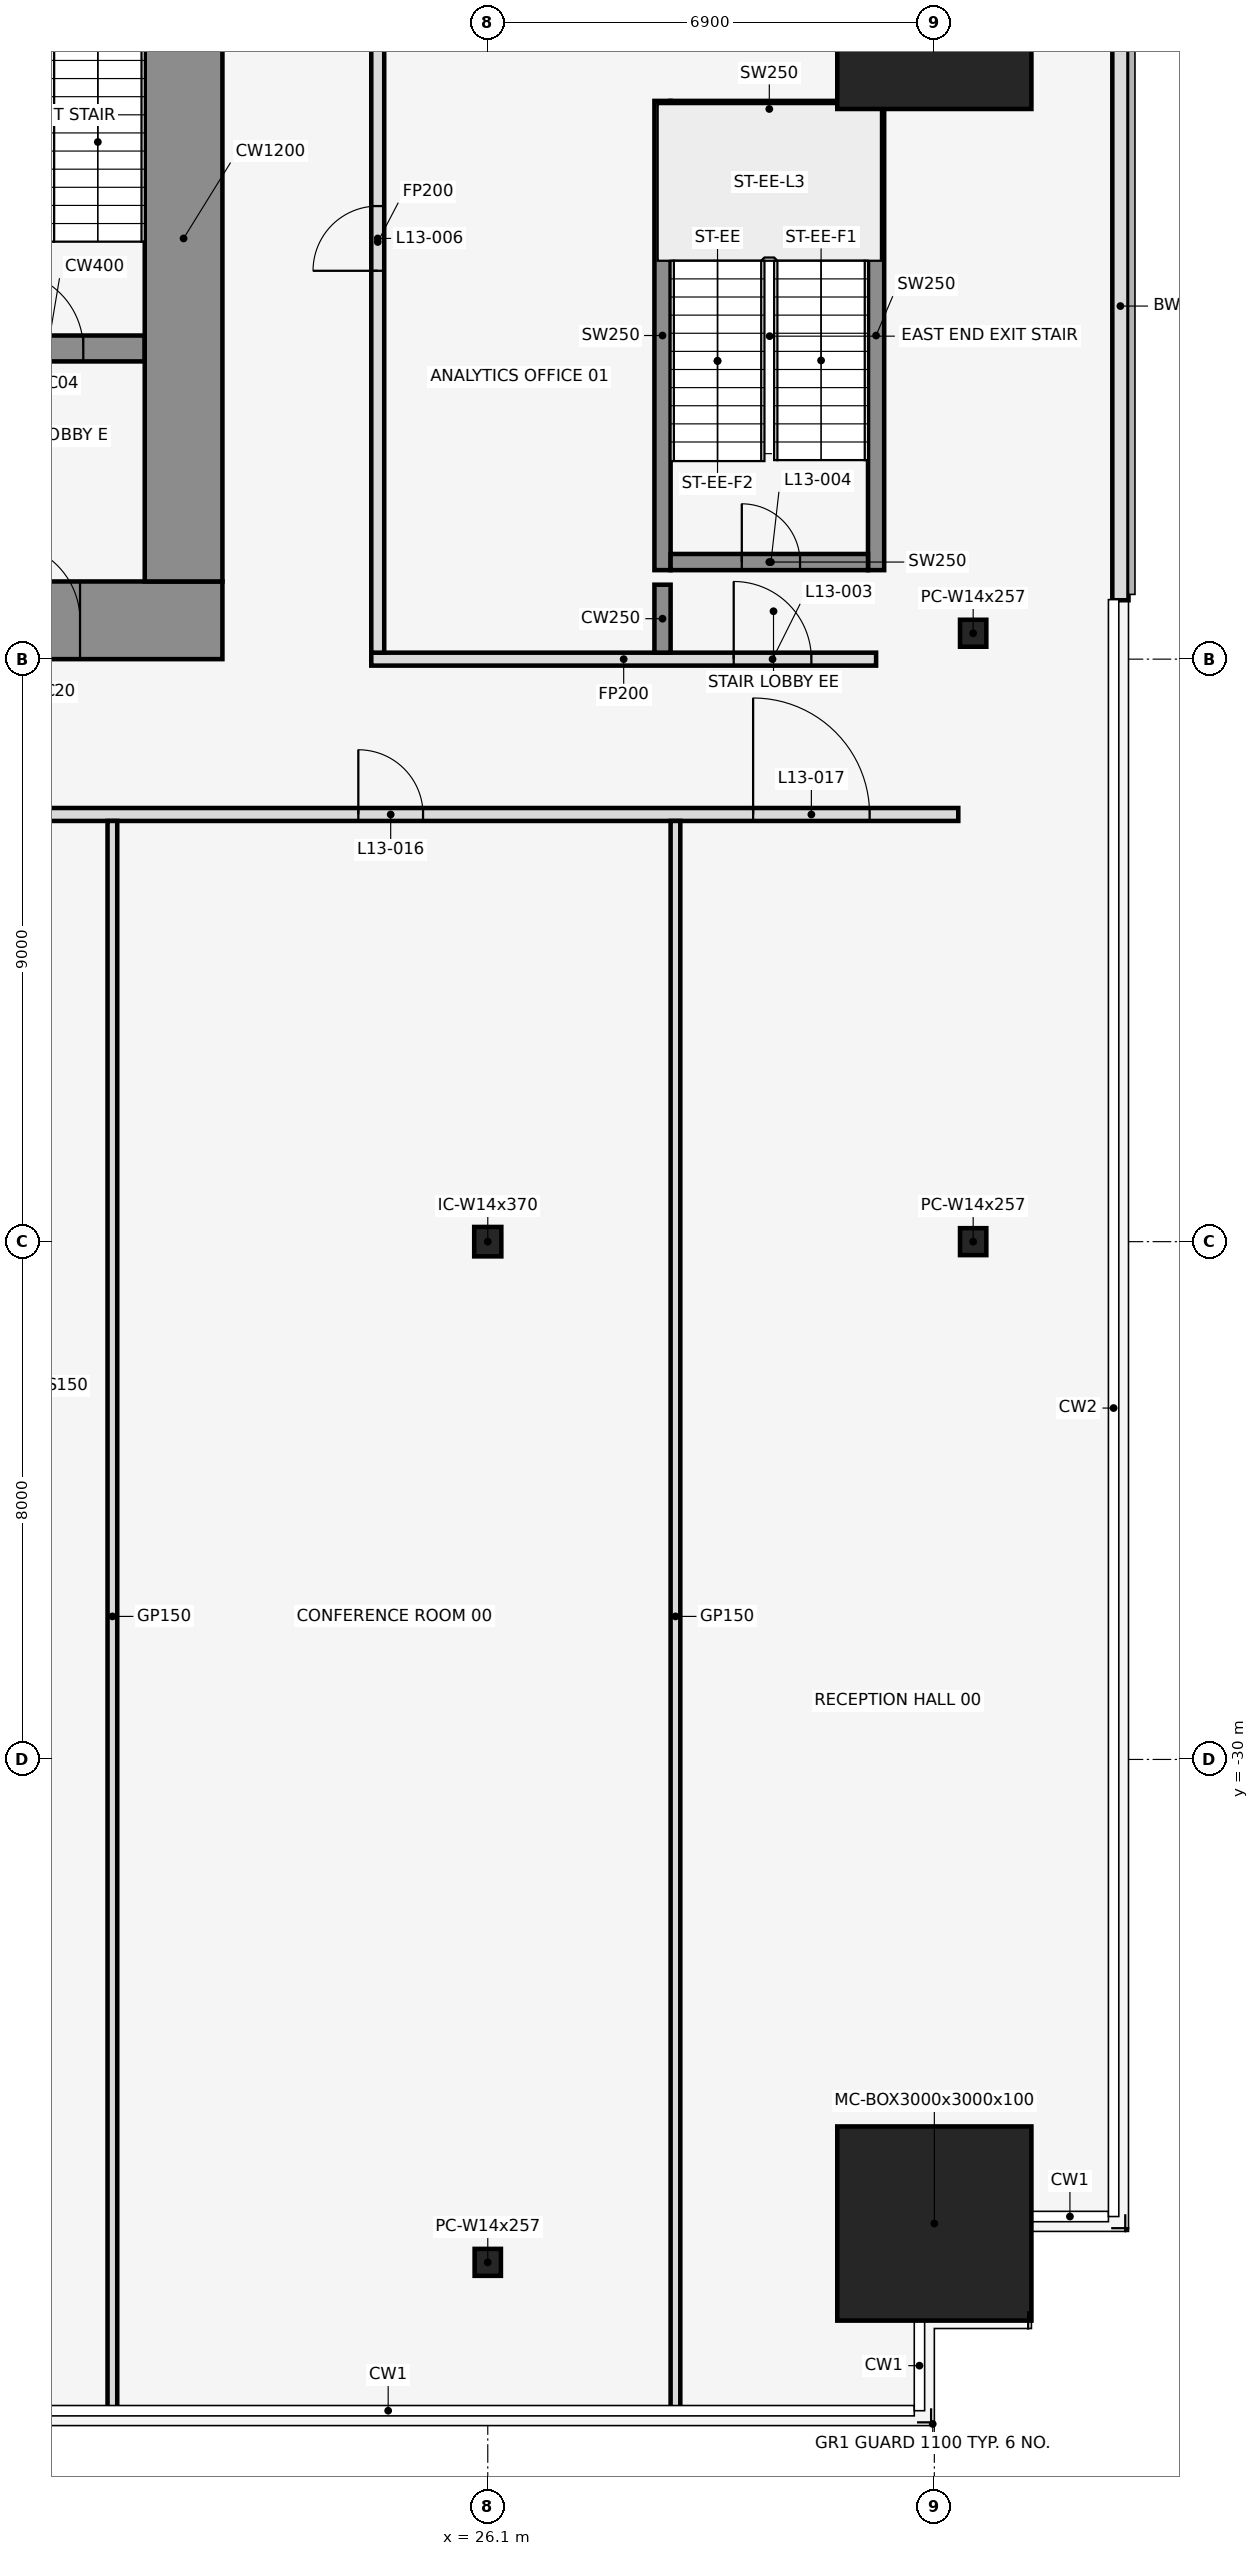
"""IFC4 building model, lengths in metres.
Left out: names, types, materials, properties, quantities, classifications, styles, units other than length and angle.
Written with IfcOpenShell. Run it as: python <this file> out.ifc"""

import sys

from ifc_helpers import new_model, si_unit, direction, frame, frame_2d, origin, origin_2d, place, context, subcontext, project, spatial, rectangle, hollow_rectangle, i_section, extrude, element, fill, save


model = new_model("IFC4")
c1 = context("Model", 3, precision=1e-05, world=origin(), true_north=direction((0.0, 1.0)))
c2 = subcontext(c1, "Body", "Model", "MODEL_VIEW")
j1 = project(units=[si_unit("LENGTHUNIT", "METRE"), si_unit("PLANEANGLEUNIT", "RADIAN")], contexts=[c1])
p1 = place(None, origin())
s1 = spatial("IfcSite", under=j1, at=p1, CompositionType="ELEMENT")
p2 = place(p1, origin())
s2 = spatial("IfcBuilding", under=s1, at=p2, CompositionType="ELEMENT")
p3 = place(p2, frame((0.0, 0.0, 66.5)))
s3 = spatial("IfcBuildingStorey", under=s2, at=p3, CompositionType="ELEMENT", Elevation=66.5)
p4 = place(p3, frame((26.1, -37.77, 0.0), z_axis=(0.0, 0.0, 1.0), x_axis=(1.0, 0.0, 0.0)))
e1 = element("IfcColumn", 1, at=p4, inside=s3, PredefinedType="COLUMN", context=c2, shape_type="SweptSolid", body=[
    extrude(i_section(OverallWidth=0.406, OverallDepth=0.417, WebThickness=0.03, FlangeThickness=0.048, at=origin_2d()), origin(), (0.0, 0.0, 1.0), 4.5),
])
for number, where, z_axis, x_axis in (
    (2, (33.0, -37.17, 0.0), (0.0, 0.0, 1.0), (1.0, 0.0, 0.0)),
    (3, (33.0, -3.0, 0.0), (0.0, 0.0, 1.0), (1.0, 0.0, 0.0)),
):
    element("IfcColumn", number, at=place(p3, frame(where, z_axis=z_axis, x_axis=x_axis)), inside=s3, PredefinedType="COLUMN", context=c2, shape_type="SweptSolid", body=[
        extrude(hollow_rectangle(XDim=3.0, YDim=3.0, WallThickness=0.1, at=origin_2d()), origin(), (0.0, 0.0, 1.0), 4.5),
    ])
for number, where, z_axis, x_axis in (
    (4, (33.6, -12.6, 0.0), (0.0, 0.0, 1.0), (1.0, 0.0, 0.0)),
    (5, (33.6, -22.0, 0.0), (0.0, 0.0, 1.0), (1.0, 0.0, 0.0)),
):
    element("IfcColumn", number, at=place(p3, frame(where, z_axis=z_axis, x_axis=x_axis)), inside=s3, PredefinedType="COLUMN", context=c2, shape_type="SweptSolid", body=[
        extrude(i_section(OverallWidth=0.406, OverallDepth=0.417, WebThickness=0.03, FlangeThickness=0.048, at=origin_2d()), origin(), (0.0, 0.0, 1.0), 4.5),
    ])
p5 = place(p3, frame((26.1, -22.0, 0.0), z_axis=(0.0, 0.0, 1.0), x_axis=(1.0, 0.0, 0.0)))
e6 = element("IfcColumn", 6, at=p5, inside=s3, PredefinedType="COLUMN", context=c2, shape_type="SweptSolid", body=[
    extrude(i_section(OverallWidth=0.419, OverallDepth=0.455, WebThickness=0.042, FlangeThickness=0.068, at=origin_2d()), origin(), (0.0, 0.0, 1.0), 4.5),
])
p6 = place(p3, frame((35.875, -12.09, 0.0), z_axis=(0.0, 0.0, 1.0), x_axis=(0.0, 1.0, 0.0)))
e7 = element("IfcWall", 7, at=p6, inside=s3, PredefinedType="STANDARD", context=c2, shape_type="SweptSolid", body=[
    extrude(rectangle(XDim=9.09, YDim=0.25, at=frame_2d((4.545, 0.0))), origin(), (0.0, 0.0, 1.0), 4.35),
])
for number, where, z_axis, x_axis in (
    (8, (28.8, -11.625, 0.0), (0.0, 0.0, 1.0), (0.0, 1.0, 0.0)),
    (9, (32.1, -11.625, 0.0), (0.0, 0.0, 1.0), (0.0, 1.0, 0.0)),
):
    element("IfcWall", number, at=place(p3, frame(where, z_axis=z_axis, x_axis=x_axis)), inside=s3, PredefinedType="SHEAR", context=c2, shape_type="SweptSolid", body=[
        extrude(rectangle(XDim=7.25, YDim=0.25, at=frame_2d((3.625, 0.0))), origin(), (0.0, 0.0, 1.0), 4.5),
    ])
p7 = place(p3, frame((28.925, -11.5, 0.0), z_axis=(0.0, 0.0, 1.0), x_axis=(1.0, 0.0, 0.0)))
e10 = element("IfcWall", 10, at=p7, inside=s3, PredefinedType="SHEAR", context=c2, shape_type="SweptSolid", body=[
    extrude(rectangle(XDim=3.05, YDim=0.25, at=frame_2d((1.525, 0.0))), origin(), (0.0, 0.0, 1.0), 4.5),
])
p8 = place(p7, frame((1.1, 0.0, 0.0)))
e11 = element("IfcOpeningElement", 11, at=p8, cuts=e10, PredefinedType="OPENING", context=c2, shape_type="SweptSolid", body=[
    extrude(rectangle(XDim=0.9, YDim=2.1, at=frame_2d((0.45, 1.05))), frame((0.0, 0.137, 0.0), z_axis=(0.0, -1.0, 0.0), x_axis=(1.0, 0.0, 0.0)), (0.0, 0.0, 1.0), 0.274),
])
p9 = place(p3, frame((28.925, -4.5, 0.0), z_axis=(0.0, 0.0, 1.0), x_axis=(1.0, 0.0, 0.0)))
e12 = element("IfcWall", 12, at=p9, inside=s3, PredefinedType="SHEAR", context=c2, shape_type="SweptSolid", body=[
    extrude(rectangle(XDim=3.05, YDim=0.25, at=frame_2d((1.525, 0.0))), origin(), (0.0, 0.0, 1.0), 4.5),
])
p10 = place(p3, frame((-33.37, -15.4, 0.0), z_axis=(0.0, 0.0, 1.0), x_axis=(1.0, 0.0, 0.0)))
e13 = element("IfcWall", 13, at=p10, inside=s3, PredefinedType="PARTITIONING", context=c2, shape_type="SweptSolid", body=[
    extrude(rectangle(XDim=66.74, YDim=0.2, at=frame_2d((33.37, 0.0))), origin(), (0.0, 0.0, 1.0), 3.418),
])
p11 = place(p10, frame((2.8, 0.0, 0.0)))
e14 = element("IfcOpeningElement", 14, at=p11, cuts=e13, PredefinedType="OPENING", context=c2, shape_type="SweptSolid", body=[
    extrude(rectangle(XDim=1.8, YDim=2.1, at=frame_2d((0.9, 1.05))), frame((0.0, 0.112, 0.0), z_axis=(0.0, -1.0, 0.0), x_axis=(1.0, 0.0, 0.0)), (0.0, 0.0, 1.0), 0.224),
])
p12 = place(p10, frame((11.17, 0.0, 0.0)))
e15 = element("IfcOpeningElement", 15, at=p12, cuts=e13, PredefinedType="OPENING", context=c2, shape_type="SweptSolid", body=[
    extrude(rectangle(XDim=0.9, YDim=2.1, at=frame_2d((0.45, 1.05))), frame((0.0, 0.112, 0.0), z_axis=(0.0, -1.0, 0.0), x_axis=(1.0, 0.0, 0.0)), (0.0, 0.0, 1.0), 0.224),
])
p13 = place(p10, frame((19.87, 0.0, 0.0)))
e16 = element("IfcOpeningElement", 16, at=p13, cuts=e13, PredefinedType="OPENING", context=c2, shape_type="SweptSolid", body=[
    extrude(rectangle(XDim=1.0, YDim=2.1, at=frame_2d((0.5, 1.05))), frame((0.0, 0.112, 0.0), z_axis=(0.0, -1.0, 0.0), x_axis=(1.0, 0.0, 0.0)), (0.0, 0.0, 1.0), 0.224),
])
p14 = place(p10, frame((26.67, 0.0, 0.0)))
e17 = element("IfcOpeningElement", 17, at=p14, cuts=e13, PredefinedType="OPENING", context=c2, shape_type="SweptSolid", body=[
    extrude(rectangle(XDim=1.8, YDim=2.1, at=frame_2d((0.9, 1.05))), frame((0.0, 0.112, 0.0), z_axis=(0.0, -1.0, 0.0), x_axis=(1.0, 0.0, 0.0)), (0.0, 0.0, 1.0), 0.224),
])
p15 = place(p10, frame((33.87, 0.0, 0.0)))
e18 = element("IfcOpeningElement", 18, at=p15, cuts=e13, PredefinedType="OPENING", context=c2, shape_type="SweptSolid", body=[
    extrude(rectangle(XDim=1.8, YDim=2.1, at=frame_2d((0.9, 1.05))), frame((0.0, 0.112, 0.0), z_axis=(0.0, -1.0, 0.0), x_axis=(1.0, 0.0, 0.0)), (0.0, 0.0, 1.0), 0.224),
])
p16 = place(p10, frame((45.47, 0.0, 0.0)))
e19 = element("IfcOpeningElement", 19, at=p16, cuts=e13, PredefinedType="OPENING", context=c2, shape_type="SweptSolid", body=[
    extrude(rectangle(XDim=1.8, YDim=2.1, at=frame_2d((0.9, 1.05))), frame((0.0, 0.112, 0.0), z_axis=(0.0, -1.0, 0.0), x_axis=(1.0, 0.0, 0.0)), (0.0, 0.0, 1.0), 0.224),
])
p17 = place(p10, frame((57.47, 0.0, 0.0)))
e20 = element("IfcOpeningElement", 20, at=p17, cuts=e13, PredefinedType="OPENING", context=c2, shape_type="SweptSolid", body=[
    extrude(rectangle(XDim=1.0, YDim=2.1, at=frame_2d((0.5, 1.05))), frame((0.0, 0.112, 0.0), z_axis=(0.0, -1.0, 0.0), x_axis=(1.0, 0.0, 0.0)), (0.0, 0.0, 1.0), 0.224),
])
p18 = place(p10, frame((63.57, 0.0, 0.0)))
e21 = element("IfcOpeningElement", 21, at=p18, cuts=e13, PredefinedType="OPENING", context=c2, shape_type="SweptSolid", body=[
    extrude(rectangle(XDim=1.8, YDim=2.1, at=frame_2d((0.9, 1.05))), frame((0.0, 0.112, 0.0), z_axis=(0.0, -1.0, 0.0), x_axis=(1.0, 0.0, 0.0)), (0.0, 0.0, 1.0), 0.224),
])
p19 = place(p3, frame((24.3, -13.0, 0.0), z_axis=(0.0, 0.0, 1.0), x_axis=(1.0, 0.0, 0.0)))
e22 = element("IfcWall", 22, at=p19, inside=s3, PredefinedType="PARTITIONING", context=c2, shape_type="SweptSolid", body=[
    extrude(rectangle(XDim=7.8, YDim=0.2, at=frame_2d((3.9, 0.0))), origin(), (0.0, 0.0, 1.0), 3.418),
])
p20 = place(p19, frame((5.6, 0.0, 0.0)))
e23 = element("IfcOpeningElement", 23, at=p20, cuts=e22, PredefinedType="OPENING", context=c2, shape_type="SweptSolid", body=[
    extrude(rectangle(XDim=1.2, YDim=2.1, at=frame_2d((0.6, 1.05))), frame((0.0, 0.112, 0.0), z_axis=(0.0, -1.0, 0.0), x_axis=(1.0, 0.0, 0.0)), (0.0, 0.0, 1.0), 0.224),
])
p21 = place(p3, frame((20.3, -40.08, 0.0), z_axis=(0.0, 0.0, 1.0), x_axis=(0.0, 1.0, 0.0)))
e24 = element("IfcWall", 24, at=p21, inside=s3, PredefinedType="PARTITIONING", context=c2, shape_type="SweptSolid", body=[
    extrude(rectangle(XDim=24.58, YDim=0.15, at=frame_2d((12.29, 0.0))), origin(), (0.0, 0.0, 1.0), 3.418),
])
p22 = place(p3, frame((24.4, -12.9, 0.0), z_axis=(0.0, 0.0, 1.0), x_axis=(0.0, 1.0, 0.0)))
e25 = element("IfcWall", 25, at=p22, inside=s3, PredefinedType="PARTITIONING", context=c2, shape_type="SweptSolid", body=[
    extrude(rectangle(XDim=12.69, YDim=0.2, at=frame_2d((6.345, 0.0))), origin(), (0.0, 0.0, 1.0), 3.418),
])
p23 = place(p22, frame((5.9, 0.0, 0.0)))
e26 = element("IfcOpeningElement", 26, at=p23, cuts=e25, PredefinedType="OPENING", context=c2, shape_type="SweptSolid", body=[
    extrude(rectangle(XDim=1.0, YDim=2.1, at=frame_2d((0.5, 1.05))), frame((0.0, 0.112, 0.0), z_axis=(0.0, -1.0, 0.0), x_axis=(1.0, 0.0, 0.0)), (0.0, 0.0, 1.0), 0.224),
])
p24 = place(p3, frame((28.8, -12.9, 0.0), z_axis=(0.0, 0.0, 1.0), x_axis=(0.0, 1.0, 0.0)))
e27 = element("IfcWall", 27, at=p24, inside=s3, PredefinedType="SHEAR", context=c2, shape_type="SweptSolid", body=[
    extrude(rectangle(XDim=1.05, YDim=0.25, at=frame_2d((0.525, 0.0))), origin(), (0.0, 0.0, 1.0), 4.5),
])
p25 = place(p3, frame((29.0, -40.08, 0.0), z_axis=(0.0, 0.0, 1.0), x_axis=(0.0, 1.0, 0.0)))
e28 = element("IfcWall", 28, at=p25, inside=s3, PredefinedType="PARTITIONING", context=c2, shape_type="SweptSolid", body=[
    extrude(rectangle(XDim=24.58, YDim=0.15, at=frame_2d((12.29, 0.0))), origin(), (0.0, 0.0, 1.0), 3.418),
])
p26 = place(p3, frame((17.8, -8.2, 0.0), z_axis=(0.0, 0.0, 1.0), x_axis=(1.0, 0.0, 0.0)))
e29 = element("IfcWall", 29, at=p26, inside=s3, PredefinedType="SHEAR", context=c2, shape_type="SweptSolid", body=[
    extrude(rectangle(XDim=3.0, YDim=0.4, at=frame_2d((1.5, 0.0))), origin(), (0.0, 0.0, 1.0), 4.5),
])
p27 = place(p26, frame((0.85, 0.0, 0.0)))
e30 = element("IfcOpeningElement", 30, at=p27, cuts=e29, PredefinedType="OPENING", context=c2, shape_type="SweptSolid", body=[
    extrude(rectangle(XDim=1.2, YDim=2.1, at=frame_2d((0.6, 1.05))), frame((0.0, 0.212, 0.0), z_axis=(0.0, -1.0, 0.0), x_axis=(1.0, 0.0, 0.0)), (0.0, 0.0, 1.0), 0.424),
])
p28 = place(p3, frame((-22.0, -12.4, 0.0), z_axis=(0.0, 0.0, 1.0), x_axis=(1.0, 0.0, 0.0)))
e31 = element("IfcWall", 31, at=p28, inside=s3, PredefinedType="SHEAR", context=c2, shape_type="SweptSolid", body=[
    extrude(rectangle(XDim=44.0, YDim=1.2, at=frame_2d((22.0, 0.0))), origin(), (0.0, 0.0, 1.0), 4.5),
])
p29 = place(p28, frame((2.2, 0.0, 0.0)))
e32 = element("IfcOpeningElement", 32, at=p29, cuts=e31, PredefinedType="OPENING", context=c2, shape_type="SweptSolid", body=[
    extrude(rectangle(XDim=1.2, YDim=2.1, at=frame_2d((0.6, 1.05))), frame((0.0, 0.612, 0.0), z_axis=(0.0, -1.0, 0.0), x_axis=(1.0, 0.0, 0.0)), (0.0, 0.0, 1.0), 1.224),
])
p30 = place(p28, frame((21.4, 0.0, 0.0)))
e33 = element("IfcOpeningElement", 33, at=p30, cuts=e31, PredefinedType="OPENING", context=c2, shape_type="SweptSolid", body=[
    extrude(rectangle(XDim=1.2, YDim=2.1, at=frame_2d((0.6, 1.05))), frame((0.0, 0.612, 0.0), z_axis=(0.0, -1.0, 0.0), x_axis=(1.0, 0.0, 0.0)), (0.0, 0.0, 1.0), 1.224),
])
p31 = place(p28, frame((40.6, 0.0, 0.0)))
e34 = element("IfcOpeningElement", 34, at=p31, cuts=e31, PredefinedType="OPENING", context=c2, shape_type="SweptSolid", body=[
    extrude(rectangle(XDim=1.2, YDim=2.1, at=frame_2d((0.6, 1.05))), frame((0.0, 0.612, 0.0), z_axis=(0.0, -1.0, 0.0), x_axis=(1.0, 0.0, 0.0)), (0.0, 0.0, 1.0), 1.224),
])
p32 = place(p28, frame((16.0, 0.0, 0.0)))
e35 = element("IfcOpeningElement", 35, at=p32, cuts=e31, PredefinedType="OPENING", context=c2, shape_type="SweptSolid", body=[
    extrude(rectangle(XDim=1.8, YDim=2.1, at=frame_2d((0.9, 1.05))), frame((0.0, 0.612, 0.0), z_axis=(0.0, -1.0, 0.0), x_axis=(1.0, 0.0, 0.0)), (0.0, 0.0, 1.0), 1.224),
])
p33 = place(p28, frame((6.3, 0.0, 0.0)))
e36 = element("IfcOpeningElement", 36, at=p33, cuts=e31, PredefinedType="OPENING", context=c2, shape_type="SweptSolid", body=[
    extrude(rectangle(XDim=1.2, YDim=2.1, at=frame_2d((0.6, 1.05))), frame((0.0, 0.612, 0.0), z_axis=(0.0, -1.0, 0.0), x_axis=(1.0, 0.0, 0.0)), (0.0, 0.0, 1.0), 1.224),
])
p34 = place(p28, frame((26.2, 0.0, 0.0)))
e37 = element("IfcOpeningElement", 37, at=p34, cuts=e31, PredefinedType="OPENING", context=c2, shape_type="SweptSolid", body=[
    extrude(rectangle(XDim=1.8, YDim=2.1, at=frame_2d((0.9, 1.05))), frame((0.0, 0.612, 0.0), z_axis=(0.0, -1.0, 0.0), x_axis=(1.0, 0.0, 0.0)), (0.0, 0.0, 1.0), 1.224),
])
p35 = place(p28, frame((36.5, 0.0, 0.0)))
e38 = element("IfcOpeningElement", 38, at=p35, cuts=e31, PredefinedType="OPENING", context=c2, shape_type="SweptSolid", body=[
    extrude(rectangle(XDim=1.2, YDim=2.1, at=frame_2d((0.6, 1.05))), frame((0.0, 0.612, 0.0), z_axis=(0.0, -1.0, 0.0), x_axis=(1.0, 0.0, 0.0)), (0.0, 0.0, 1.0), 1.224),
])
p36 = place(p3, frame((21.4, -11.8, 0.0), z_axis=(0.0, 0.0, 1.0), x_axis=(0.0, 1.0, 0.0)))
e39 = element("IfcWall", 39, at=p36, inside=s3, PredefinedType="SHEAR", context=c2, shape_type="SweptSolid", body=[
    extrude(rectangle(XDim=10.6, YDim=1.2, at=frame_2d((5.3, 0.0))), origin(), (0.0, 0.0, 1.0), 4.5),
])
p37 = place(p20, origin())
e40 = element("IfcDoor", 40, at=p37, inside=s3, OperationType="SINGLE_SWING_RIGHT", PredefinedType="DOOR", context=c2, shape_type="SweptSolid", body=[
    extrude(rectangle(XDim=1.2, YDim=2.1, at=frame_2d((0.6, 1.05))), frame((0.0, 0.025, 0.0), z_axis=(0.0, -1.0, 0.0), x_axis=(1.0, 0.0, 0.0)), (0.0, 0.0, 1.0), 0.05),
])
fill(e23, e40)
p38 = place(p8, origin())
e41 = element("IfcDoor", 41, at=p38, inside=s3, OperationType="SINGLE_SWING_LEFT", PredefinedType="DOOR", context=c2, shape_type="SweptSolid", body=[
    extrude(rectangle(XDim=0.9, YDim=2.1, at=frame_2d((0.45, 1.05))), frame((0.0, 0.025, 0.0), z_axis=(0.0, -1.0, 0.0), x_axis=(1.0, 0.0, 0.0)), (0.0, 0.0, 1.0), 0.05),
])
fill(e11, e41)
p39 = place(p23, frame((1.0, 0.0, 0.0), z_axis=(0.0, 0.0, 1.0), x_axis=(-1.0, 0.0, 0.0)))
e42 = element("IfcDoor", 42, at=p39, inside=s3, OperationType="SINGLE_SWING_RIGHT", PredefinedType="DOOR", context=c2, shape_type="SweptSolid", body=[
    extrude(rectangle(XDim=1.0, YDim=2.1, at=frame_2d((0.5, 1.05))), frame((0.0, 0.025, 0.0), z_axis=(0.0, -1.0, 0.0), x_axis=(1.0, 0.0, 0.0)), (0.0, 0.0, 1.0), 0.05),
])
fill(e26, e42)
p40 = place(p17, frame((1.0, 0.0, 0.0), z_axis=(0.0, 0.0, 1.0), x_axis=(-1.0, 0.0, 0.0)))
e43 = element("IfcDoor", 43, at=p40, inside=s3, OperationType="SINGLE_SWING_LEFT", PredefinedType="DOOR", context=c2, shape_type="SweptSolid", body=[
    extrude(rectangle(XDim=1.0, YDim=2.1, at=frame_2d((0.5, 1.05))), frame((0.0, 0.025, 0.0), z_axis=(0.0, -1.0, 0.0), x_axis=(1.0, 0.0, 0.0)), (0.0, 0.0, 1.0), 0.05),
])
fill(e20, e43)
p41 = place(p18, origin())
e44 = element("IfcDoor", 44, at=p41, inside=s3, OperationType="SINGLE_SWING_LEFT", PredefinedType="DOOR", context=c2, shape_type="SweptSolid", body=[
    extrude(rectangle(XDim=1.8, YDim=2.1, at=frame_2d((0.9, 1.05))), frame((0.0, 0.025, 0.0), z_axis=(0.0, -1.0, 0.0), x_axis=(1.0, 0.0, 0.0)), (0.0, 0.0, 1.0), 0.05),
])
fill(e21, e44)
p42 = place(p27, origin())
e45 = element("IfcDoor", 45, at=p42, inside=s3, OperationType="SINGLE_SWING_RIGHT", PredefinedType="DOOR", context=c2, shape_type="SweptSolid", body=[
    extrude(rectangle(XDim=1.2, YDim=2.1, at=frame_2d((0.6, 1.05))), frame((0.0, 0.025, 0.0), z_axis=(0.0, -1.0, 0.0), x_axis=(1.0, 0.0, 0.0)), (0.0, 0.0, 1.0), 0.05),
])
fill(e30, e45)
p43 = place(p31, frame((1.2, 0.0, 0.0), z_axis=(0.0, 0.0, 1.0), x_axis=(-1.0, 0.0, 0.0)))
e46 = element("IfcDoor", 46, at=p43, inside=s3, OperationType="SINGLE_SWING_RIGHT", PredefinedType="DOOR", context=c2, shape_type="SweptSolid", body=[
    extrude(rectangle(XDim=1.2, YDim=2.1, at=frame_2d((0.6, 1.05))), frame((0.0, 0.025, 0.0), z_axis=(0.0, -1.0, 0.0), x_axis=(1.0, 0.0, 0.0)), (0.0, 0.0, 1.0), 0.05),
])
fill(e34, e46)
save(model, sys.argv[1])
